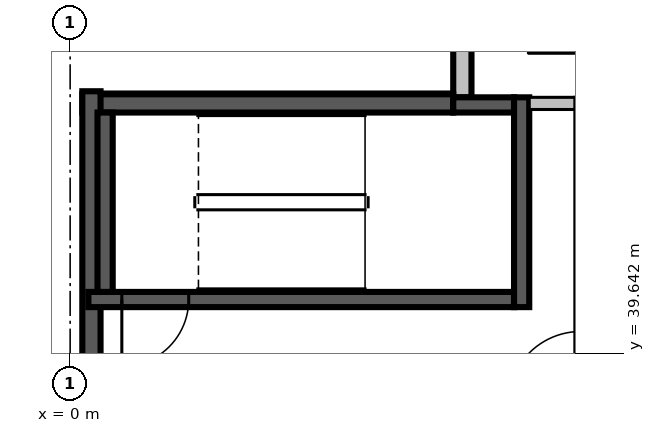
"""IFC4 building model, lengths in metres.
Left out: names, types, materials, properties, quantities, classifications, styles, units other than length and angle.
Written with IfcOpenShell. Run it as: python <this file> out.ifc"""

import sys

from ifc_helpers import new_model, si_unit, direction, frame, frame_2d, origin, place, context, subcontext, project, spatial, rectangle, extrude, source, transform, mapped, element, fill, save


model = new_model("IFC4")
c1 = context("Model", 3, precision=1e-05, world=origin(), true_north=direction((0.0, 1.0)))
c2 = subcontext(c1, "Body", "Model", "MODEL_VIEW")
j1 = project(units=[si_unit("LENGTHUNIT", "METRE"), si_unit("PLANEANGLEUNIT", "RADIAN")], contexts=[c1])
p1 = place(None, origin())
s1 = spatial("IfcSite", under=j1, at=p1, CompositionType="ELEMENT")
p2 = place(p1, origin())
s2 = spatial("IfcBuilding", under=s1, at=p2, CompositionType="ELEMENT")
p3 = place(p2, frame((0.0, 0.0, 111.9)))
s3 = spatial("IfcBuildingStorey", under=s2, at=p3, CompositionType="ELEMENT", Elevation=111.9)
m1 = source(origin(), c2, "Body", "SweptSolid", [
    extrude(rectangle(XDim=9.91, YDim=0.3, at=frame_2d((4.955, 0.0))), origin(), (0.0, 0.0, 1.0), 3.8),
])
p4 = place(p3, frame((6.45, 53.76, 0.0), z_axis=(0.0, 0.0, 1.0), x_axis=(0.0, -1.0, 0.0)))
e1 = element("IfcWall", 1, at=p4, inside=s3, PredefinedType="STANDARD", context=c2, shape_type="MappedRepresentation", body=[
    mapped(m1, transform((0.0, 0.0, 0.0), scale=1.0)),
])
m2 = source(origin(), c2, "Body", "SweptSolid", [
    extrude(rectangle(XDim=3.6, YDim=2.7, at=frame_2d((1.8, 1.35))), frame((0.0, 0.16, 0.0), z_axis=(0.0, -1.0, 0.0), x_axis=(1.0, 0.0, 0.0)), (0.0, 0.0, 1.0), 0.32),
])
p5 = place(p4, frame((3.39, 0.0, 0.6)))
e2 = element("IfcOpeningElement", 2, at=p5, cuts=e1, PredefinedType="OPENING", context=c2, shape_type="MappedRepresentation", body=[
    mapped(m2, transform((0.0, 0.0, 0.0), scale=1.0)),
])
m3 = source(origin(), c2, "Body", "SweptSolid", [
    extrude(rectangle(XDim=2.4, YDim=2.7, at=frame_2d((1.2, 1.35))), frame((0.0, 0.16, 0.0), z_axis=(0.0, -1.0, 0.0), x_axis=(1.0, 0.0, 0.0)), (0.0, 0.0, 1.0), 0.32),
])
p6 = place(p4, frame((0.495, 0.0, 0.6)))
e3 = element("IfcOpeningElement", 3, at=p6, cuts=e1, PredefinedType="OPENING", context=c2, shape_type="MappedRepresentation", body=[
    mapped(m3, transform((0.0, 0.0, 0.0), scale=1.0)),
])
m4 = source(origin(), c2, "Body", "SweptSolid", [
    extrude(rectangle(XDim=6.1, YDim=0.3, at=frame_2d((3.05, 0.0))), origin(), (0.0, 0.0, 1.0), 3.8),
])
p7 = place(p3, frame((6.3, 43.75, 0.0), z_axis=(0.0, 0.0, 1.0), x_axis=(-1.0, 0.0, 0.0)))
e4 = element("IfcWall", 4, at=p7, inside=s3, PredefinedType="SOLIDWALL", context=c2, shape_type="MappedRepresentation", body=[
    mapped(m4, transform((0.0, 0.0, 0.0), scale=1.0)),
])
m5 = source(origin(), c2, "Body", "SweptSolid", [
    extrude(rectangle(XDim=5.65, YDim=0.3, at=frame_2d((2.825, 0.0))), origin(), (0.0, 0.0, 1.0), 3.8),
])
p8 = place(p3, frame((0.35, 43.95, 0.0), z_axis=(0.0, 0.0, 1.0), x_axis=(0.0, -1.0, 0.0)))
e5 = element("IfcWall", 5, at=p8, inside=s3, PredefinedType="SOLIDWALL", context=c2, shape_type="MappedRepresentation", body=[
    mapped(m5, transform((0.0, 0.0, 0.0), scale=1.0)),
])
m6 = source(origin(), c2, "Body", "SweptSolid", [
    extrude(rectangle(XDim=7.0, YDim=0.25, at=frame_2d((3.5, 0.0))), origin(), (0.0, 0.0, 1.0), 3.8),
])
p9 = place(p3, frame((0.3, 40.525, 0.0), z_axis=(0.0, 0.0, 1.0), x_axis=(1.0, 0.0, 0.0)))
e6 = element("IfcWall", 6, at=p9, inside=s3, PredefinedType="SOLIDWALL", context=c2, shape_type="MappedRepresentation", body=[
    mapped(m6, transform((0.0, 0.0, 0.0), scale=1.0)),
])
m7 = source(origin(), c2, "Body", "SweptSolid", [
    extrude(rectangle(XDim=1.1, YDim=2.1, at=frame_2d((0.55, 1.05))), frame((0.0, 0.135, 0.0), z_axis=(0.0, -1.0, 0.0), x_axis=(1.0, 0.0, 0.0)), (0.0, 0.0, 1.0), 0.27),
])
p10 = place(p9, frame((0.55, 0.0, 0.0)))
e7 = element("IfcOpeningElement", 7, at=p10, cuts=e6, PredefinedType="OPENING", context=c2, shape_type="MappedRepresentation", body=[
    mapped(m7, transform((0.0, 0.0, 0.0), scale=1.0)),
])
m8 = source(origin(), c2, "Body", "SweptSolid", [
    extrude(rectangle(XDim=1.0, YDim=0.25, at=frame_2d((0.5, 0.0))), origin(), (0.0, 0.0, 1.0), 3.8),
])
p11 = place(p3, frame((6.3, 43.725, 0.0), z_axis=(0.0, 0.0, 1.0), x_axis=(1.0, 0.0, 0.0)))
e8 = element("IfcWall", 8, at=p11, inside=s3, PredefinedType="SOLIDWALL", context=c2, shape_type="MappedRepresentation", body=[
    mapped(m8, transform((0.0, 0.0, 0.0), scale=1.0)),
])
m9 = source(origin(), c2, "Body", "SweptSolid", [
    extrude(rectangle(XDim=3.45, YDim=0.25, at=frame_2d((1.725, 0.0))), origin(), (0.0, 0.0, 1.0), 3.8),
])
p12 = place(p3, frame((7.425, 40.4, 0.0), z_axis=(0.0, 0.0, 1.0), x_axis=(0.0, 1.0, 0.0)))
e9 = element("IfcWall", 9, at=p12, inside=s3, PredefinedType="SOLIDWALL", context=c2, shape_type="MappedRepresentation", body=[
    mapped(m9, transform((0.0, 0.0, 0.0), scale=1.0)),
])
m10 = source(origin(), c2, "Body", "SweptSolid", [
    extrude(rectangle(XDim=2.95, YDim=0.25, at=frame_2d((1.475, 0.0))), origin(), (0.0, 0.0, 1.0), 3.8),
])
p13 = place(p3, frame((0.575, 40.65, 0.0), z_axis=(0.0, 0.0, 1.0), x_axis=(0.0, 1.0, 0.0)))
e10 = element("IfcWall", 10, at=p13, inside=s3, PredefinedType="SOLIDWALL", context=c2, shape_type="MappedRepresentation", body=[
    mapped(m10, transform((0.0, 0.0, 0.0), scale=1.0)),
])
m11 = source(origin(), c2, "Body", "SweptSolid", [
    extrude(rectangle(XDim=0.75, YDim=0.2, at=frame_2d((0.375, 0.0))), origin(), (0.0, 0.0, 1.0), 3.8),
])
p14 = place(p3, frame((7.55, 43.75, 0.0), z_axis=(0.0, 0.0, 1.0), x_axis=(1.0, 0.0, 0.0)))
e11 = element("IfcWall", 11, at=p14, inside=s3, PredefinedType="PARTITIONING", context=c2, shape_type="MappedRepresentation", body=[
    mapped(m11, transform((0.0, 0.0, 0.0), scale=1.0)),
])
m12 = source(origin(), c2, "Body", "SweptSolid", [
    extrude(rectangle(XDim=1.1, YDim=2.1, at=frame_2d((0.55, 1.05))), frame((0.0, 0.025, 0.0), z_axis=(0.0, -1.0, 0.0), x_axis=(1.0, 0.0, 0.0)), (0.0, 0.0, 1.0), 0.05),
])
p15 = place(p10, origin())
e12 = element("IfcDoor", 12, at=p15, inside=s3, OperationType="SINGLE_SWING_RIGHT", PredefinedType="DOOR", context=c2, shape_type="MappedRepresentation", body=[
    mapped(m12, transform((0.0, 0.0, 0.0), scale=1.0)),
])
fill(e7, e12)
save(model, sys.argv[1])
